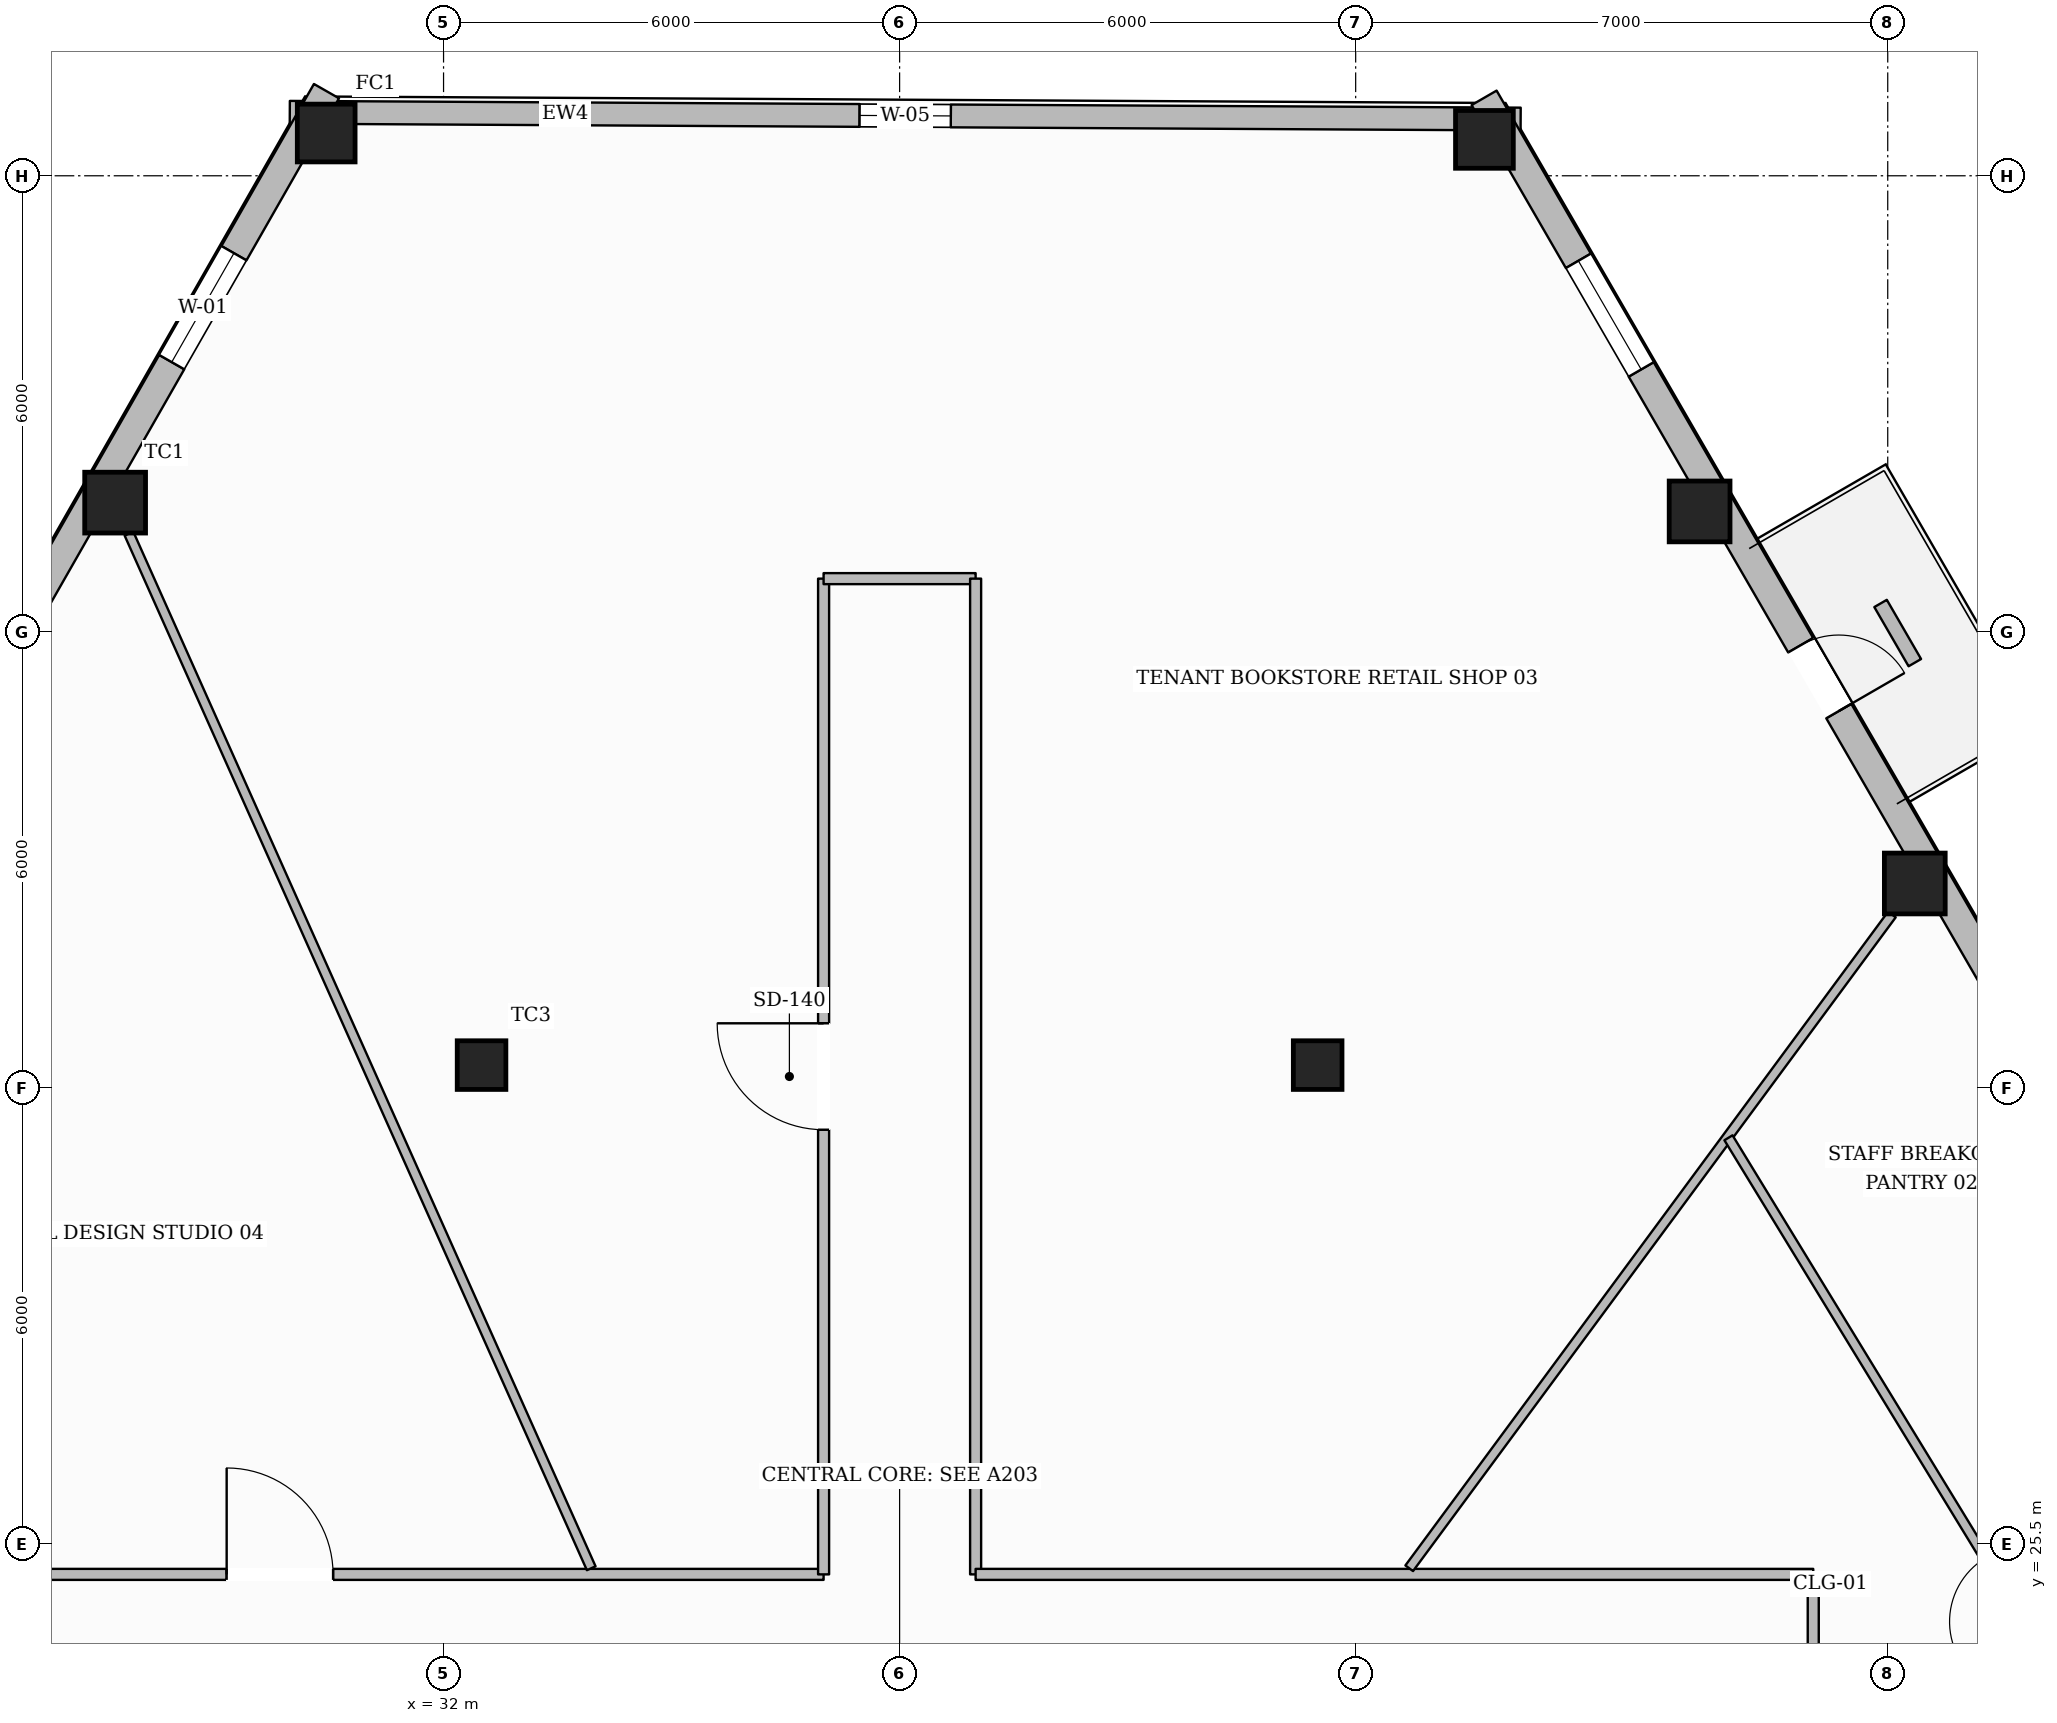
"""IFC4 building model, lengths in metres.
Left out: names, types, materials, properties, quantities, classifications, styles, units other than length and angle.
Written with IfcOpenShell. Run it as: python <this file> out.ifc"""

import sys

from ifc_helpers import new_model, si_unit, direction, frame, frame_2d, origin, origin_2d, place, context, subcontext, project, spatial, rectangle, hollow_rectangle, extrude, element, fill, save


model = new_model("IFC4")
c1 = context("Model", 3, precision=1e-05, world=origin(), true_north=direction((0.0, 1.0)))
c2 = subcontext(c1, "Body", "Model", "MODEL_VIEW")
j1 = project(units=[si_unit("LENGTHUNIT", "METRE"), si_unit("PLANEANGLEUNIT", "RADIAN")], contexts=[c1])
p1 = place(None, origin())
s1 = spatial("IfcSite", under=j1, at=p1, CompositionType="ELEMENT")
p2 = place(p1, origin())
s2 = spatial("IfcBuilding", under=s1, at=p2, CompositionType="ELEMENT")
p3 = place(p2, frame((0.0, 0.0, 40.65)))
s3 = spatial("IfcBuildingStorey", under=s2, at=p3, CompositionType="ELEMENT", Elevation=40.65)
p4 = place(p3, frame((30.456, 44.062, 0.0), z_axis=(0.0, 0.0, 1.0), x_axis=(1.0, 0.0, 0.0)))
e1 = element("IfcColumn", 1, at=p4, inside=s3, PredefinedType="COLUMN", context=c2, shape_type="SweptSolid", body=[
    extrude(hollow_rectangle(XDim=0.76, YDim=0.76, WallThickness=0.035, at=origin_2d()), origin(), (0.0, 0.0, 1.0), 3.59),
])
for number, where, z_axis, x_axis in (
    (2, (27.679, 39.2, 0.0), (0.0, 0.0, 1.0), (1.0, 0.0, 0.0)),
    (3, (51.356, 34.189, 0.0), (0.0, 0.0, 1.0), (1.0, 0.0, 0.0)),
    (4, (48.525, 39.084, 0.0), (0.0, 0.0, 1.0), (1.0, 0.0, 0.0)),
):
    element("IfcColumn", number, at=place(p3, frame(where, z_axis=z_axis, x_axis=x_axis)), inside=s3, PredefinedType="COLUMN", context=c2, shape_type="SweptSolid", body=[
        extrude(hollow_rectangle(XDim=0.8, YDim=0.8, WallThickness=0.036, at=origin_2d()), origin(), (0.0, 0.0, 1.0), 3.59),
    ])
p5 = place(p3, frame((45.694, 43.979, 0.0), z_axis=(0.0, 0.0, 1.0), x_axis=(1.0, 0.0, 0.0)))
e5 = element("IfcColumn", 5, at=p5, inside=s3, PredefinedType="COLUMN", context=c2, shape_type="SweptSolid", body=[
    extrude(hollow_rectangle(XDim=0.76, YDim=0.76, WallThickness=0.035, at=origin_2d()), origin(), (0.0, 0.0, 1.0), 3.59),
])
for number, where, z_axis, x_axis in (
    (6, (32.5, 31.8, 0.0), (0.0, 0.0, 1.0), (1.0, 0.0, 0.0)),
    (7, (43.5, 31.8, 0.0), (0.0, 0.0, 1.0), (1.0, 0.0, 0.0)),
):
    element("IfcColumn", number, at=place(p3, frame(where, z_axis=z_axis, x_axis=x_axis)), inside=s3, PredefinedType="COLUMN", context=c2, shape_type="SweptSolid", body=[
        extrude(hollow_rectangle(XDim=0.64, YDim=0.64, WallThickness=0.028, at=origin_2d()), origin(), (0.0, 0.0, 1.0), 3.59),
    ])
p6 = place(p3, frame((29.977, 44.335, 0.0), z_axis=(0.0, 0.0, 1.0), x_axis=(0.999984941481, -0.005487878522, 0.0)))
e8 = element("IfcWall", 8, at=p6, inside=s3, PredefinedType="STANDARD", context=c2, shape_type="SweptSolid", body=[
    extrude(rectangle(XDim=16.193, YDim=0.3, at=frame_2d((8.097, 0.0))), origin(), (0.0, 0.0, 1.0), 2.97),
])
p7 = place(p6, frame((7.497, 0.0, 0.65)))
e9 = element("IfcOpeningElement", 9, at=p7, cuts=e8, PredefinedType="OPENING", context=c2, shape_type="SweptSolid", body=[
    extrude(rectangle(XDim=1.2, YDim=1.7, at=frame_2d((0.6, 0.85))), frame((0.0, 0.16, 0.0), z_axis=(0.0, -1.0, 0.0), x_axis=(1.0, 0.0, 0.0)), (0.0, 0.0, 1.0), 0.32),
])
p8 = place(p3, frame((13.324, 14.608, 0.0), z_axis=(0.0, 0.0, 1.0), x_axis=(0.495909124573, 0.868374423947, 0.0)))
e10 = element("IfcWall", 10, at=p8, inside=s3, PredefinedType="STANDARD", context=c2, shape_type="SweptSolid", body=[
    extrude(rectangle(XDim=34.553, YDim=0.38, at=frame_2d((17.277, 0.0))), origin(), (0.0, 0.0, 1.0), 2.97),
])
p9 = place(p8, frame((30.448, 0.0, 0.65)))
e11 = element("IfcOpeningElement", 11, at=p9, cuts=e10, PredefinedType="OPENING", context=c2, shape_type="SweptSolid", body=[
    extrude(rectangle(XDim=1.65, YDim=1.75, at=frame_2d((0.825, 0.875))), frame((0.0, 0.2, 0.0), z_axis=(0.0, -1.0, 0.0), x_axis=(1.0, 0.0, 0.0)), (0.0, 0.0, 1.0), 0.4),
])
p10 = place(p8, frame((24.849, 0.0, 0.65)))
e12 = element("IfcOpeningElement", 12, at=p10, cuts=e10, PredefinedType="OPENING", context=c2, shape_type="SweptSolid", body=[
    extrude(rectangle(XDim=1.65, YDim=1.75, at=frame_2d((0.825, 0.875))), frame((0.0, 0.2, 0.0), z_axis=(0.0, -1.0, 0.0), x_axis=(1.0, 0.0, 0.0)), (0.0, 0.0, 1.0), 0.4),
])
p11 = place(p8, frame((19.249, 0.0, 0.65)))
e13 = element("IfcOpeningElement", 13, at=p11, cuts=e10, PredefinedType="OPENING", context=c2, shape_type="SweptSolid", body=[
    extrude(rectangle(XDim=1.65, YDim=1.75, at=frame_2d((0.825, 0.875))), frame((0.0, 0.2, 0.0), z_axis=(0.0, -1.0, 0.0), x_axis=(1.0, 0.0, 0.0)), (0.0, 0.0, 1.0), 0.4),
])
p12 = place(p8, frame((8.05, 0.0, 0.65)))
e14 = element("IfcOpeningElement", 14, at=p12, cuts=e10, PredefinedType="OPENING", context=c2, shape_type="SweptSolid", body=[
    extrude(rectangle(XDim=1.65, YDim=1.75, at=frame_2d((0.825, 0.875))), frame((0.0, 0.2, 0.0), z_axis=(0.0, -1.0, 0.0), x_axis=(1.0, 0.0, 0.0)), (0.0, 0.0, 1.0), 0.4),
])
p13 = place(p8, frame((2.451, 0.0, 0.65)))
e15 = element("IfcOpeningElement", 15, at=p13, cuts=e10, PredefinedType="OPENING", context=c2, shape_type="SweptSolid", body=[
    extrude(rectangle(XDim=1.65, YDim=1.75, at=frame_2d((0.825, 0.875))), frame((0.0, 0.2, 0.0), z_axis=(0.0, -1.0, 0.0), x_axis=(1.0, 0.0, 0.0)), (0.0, 0.0, 1.0), 0.4),
])
p14 = place(p3, frame((45.69, 44.525, 0.0), z_axis=(0.0, 0.0, 1.0), x_axis=(0.500663446356, -0.865642023866, 0.0)))
e16 = element("IfcWall", 16, at=p14, inside=s3, PredefinedType="STANDARD", context=c2, shape_type="SweptSolid", body=[
    extrude(rectangle(XDim=34.878, YDim=0.38, at=frame_2d((17.439, 0.0))), origin(), (0.0, 0.0, 1.0), 2.97),
])
p15 = place(p14, frame((8.319, 0.0, 0.0)))
e17 = element("IfcOpeningElement", 17, at=p15, cuts=e16, PredefinedType="OPENING", context=c2, shape_type="SweptSolid", body=[
    extrude(rectangle(XDim=1.0, YDim=2.2, at=frame_2d((0.5, 1.1))), frame((0.0, 0.2, 0.0), z_axis=(0.0, -1.0, 0.0), x_axis=(1.0, 0.0, 0.0)), (0.0, 0.0, 1.0), 0.4),
])
p16 = place(p14, frame((30.75, 0.0, 0.65)))
e18 = element("IfcOpeningElement", 18, at=p16, cuts=e16, PredefinedType="OPENING", context=c2, shape_type="SweptSolid", body=[
    extrude(rectangle(XDim=1.65, YDim=1.75, at=frame_2d((0.825, 0.875))), frame((0.0, 0.2, 0.0), z_axis=(0.0, -1.0, 0.0), x_axis=(1.0, 0.0, 0.0)), (0.0, 0.0, 1.0), 0.4),
])
p17 = place(p14, frame((25.095, 0.0, 0.65)))
e19 = element("IfcOpeningElement", 19, at=p17, cuts=e16, PredefinedType="OPENING", context=c2, shape_type="SweptSolid", body=[
    extrude(rectangle(XDim=1.65, YDim=1.75, at=frame_2d((0.825, 0.875))), frame((0.0, 0.2, 0.0), z_axis=(0.0, -1.0, 0.0), x_axis=(1.0, 0.0, 0.0)), (0.0, 0.0, 1.0), 0.4),
])
p18 = place(p14, frame((19.441, 0.0, 0.65)))
e20 = element("IfcOpeningElement", 20, at=p18, cuts=e16, PredefinedType="OPENING", context=c2, shape_type="SweptSolid", body=[
    extrude(rectangle(XDim=1.65, YDim=1.75, at=frame_2d((0.825, 0.875))), frame((0.0, 0.2, 0.0), z_axis=(0.0, -1.0, 0.0), x_axis=(1.0, 0.0, 0.0)), (0.0, 0.0, 1.0), 0.4),
])
p19 = place(p14, frame((2.477, 0.0, 0.65)))
e21 = element("IfcOpeningElement", 21, at=p19, cuts=e16, PredefinedType="OPENING", context=c2, shape_type="SweptSolid", body=[
    extrude(rectangle(XDim=1.65, YDim=1.75, at=frame_2d((0.825, 0.875))), frame((0.0, 0.2, 0.0), z_axis=(0.0, -1.0, 0.0), x_axis=(1.0, 0.0, 0.0)), (0.0, 0.0, 1.0), 0.4),
])
p20 = place(p3, frame((51.356, 37.094, 0.0), z_axis=(0.0, 0.0, 1.0), x_axis=(-0.500747535571, 0.865593383535, 0.0)))
e22 = element("IfcWall", 22, at=p20, inside=s3, PredefinedType="USERDEFINED", context=c2, shape_type="SweptSolid", body=[
    extrude(rectangle(XDim=0.9, YDim=0.19, at=frame_2d((0.45, 0.0))), origin(), (0.0, 0.0, 1.0), 0.5),
])
p21 = place(p3, frame((25.98, 25.1, 0.0), z_axis=(0.0, 0.0, 1.0), x_axis=(1.0, 0.0, 0.0)))
e23 = element("IfcWall", 23, at=p21, inside=s3, PredefinedType="PARTITIONING", context=c2, shape_type="SweptSolid", body=[
    extrude(rectangle(XDim=11.02, YDim=0.145, at=frame_2d((5.51, 0.0))), origin(), (0.0, 0.0, 1.0), 3.59),
])
p22 = place(p21, frame((3.167, 0.0, 0.0)))
e24 = element("IfcOpeningElement", 24, at=p22, cuts=e23, PredefinedType="OPENING", context=c2, shape_type="SweptSolid", body=[
    extrude(rectangle(XDim=1.4, YDim=2.2, at=frame_2d((0.7, 1.1))), frame((0.0, 0.083, 0.0), z_axis=(0.0, -1.0, 0.0), x_axis=(1.0, 0.0, 0.0)), (0.0, 0.0, 1.0), 0.165),
])
p23 = place(p3, frame((37.0, 25.1, 0.0), z_axis=(0.0, 0.0, 1.0), x_axis=(0.0, 1.0, 0.0)))
e25 = element("IfcWall", 25, at=p23, inside=s3, PredefinedType="PARTITIONING", context=c2, shape_type="SweptSolid", body=[
    extrude(rectangle(XDim=13.1, YDim=0.145, at=frame_2d((6.55, 0.0))), origin(), (0.0, 0.0, 1.0), 3.59),
])
p24 = place(p23, frame((5.85, 0.0, 0.0)))
e26 = element("IfcOpeningElement", 26, at=p24, cuts=e25, PredefinedType="OPENING", context=c2, shape_type="SweptSolid", body=[
    extrude(rectangle(XDim=1.4, YDim=2.2, at=frame_2d((0.7, 1.1))), frame((0.0, 0.083, 0.0), z_axis=(0.0, -1.0, 0.0), x_axis=(1.0, 0.0, 0.0)), (0.0, 0.0, 1.0), 0.165),
])
p25 = place(p3, frame((37.0, 38.2, 0.0), z_axis=(0.0, 0.0, 1.0), x_axis=(1.0, 0.0, 0.0)))
e27 = element("IfcWall", 27, at=p25, inside=s3, PredefinedType="PARTITIONING", context=c2, shape_type="SweptSolid", body=[
    extrude(rectangle(XDim=2.0, YDim=0.145, at=frame_2d((1.0, 0.0))), origin(), (0.0, 0.0, 1.0), 3.59),
])
p26 = place(p3, frame((39.0, 38.2, 0.0), z_axis=(0.0, 0.0, 1.0), x_axis=(0.0, -1.0, 0.0)))
e28 = element("IfcWall", 28, at=p26, inside=s3, PredefinedType="PARTITIONING", context=c2, shape_type="SweptSolid", body=[
    extrude(rectangle(XDim=13.1, YDim=0.145, at=frame_2d((6.55, 0.0))), origin(), (0.0, 0.0, 1.0), 3.59),
])
p27 = place(p3, frame((39.0, 25.1, 0.0), z_axis=(0.0, 0.0, 1.0), x_axis=(1.0, 0.0, 0.0)))
e29 = element("IfcWall", 29, at=p27, inside=s3, PredefinedType="PARTITIONING", context=c2, shape_type="SweptSolid", body=[
    extrude(rectangle(XDim=11.02, YDim=0.145, at=frame_2d((5.51, 0.0))), origin(), (0.0, 0.0, 1.0), 3.59),
])
p28 = place(p3, frame((50.02, 25.1, 0.0), z_axis=(0.0, 0.0, 1.0), x_axis=(0.0, -1.0, 0.0)))
e30 = element("IfcWall", 30, at=p28, inside=s3, PredefinedType="PARTITIONING", context=c2, shape_type="SweptSolid", body=[
    extrude(rectangle(XDim=16.0, YDim=0.145, at=frame_2d((8.0, 0.0))), origin(), (0.0, 0.0, 1.0), 3.278),
])
p29 = place(p28, frame((3.152, 0.0, 0.0)))
e31 = element("IfcOpeningElement", 31, at=p29, cuts=e30, PredefinedType="OPENING", context=c2, shape_type="SweptSolid", body=[
    extrude(rectangle(XDim=0.98, YDim=2.15, at=frame_2d((0.49, 1.075))), frame((0.0, 0.083, 0.0), z_axis=(0.0, -1.0, 0.0), x_axis=(1.0, 0.0, 0.0)), (0.0, 0.0, 1.0), 0.165),
])
p30 = place(p3, frame((44.704, 25.18, 0.0), z_axis=(0.0, 0.0, 1.0), x_axis=(0.593980052091, 0.804479768371, 0.0)))
e32 = element("IfcWall", 32, at=p30, inside=s3, PredefinedType="PARTITIONING", context=c2, shape_type="SweptSolid", body=[
    extrude(rectangle(XDim=10.691, YDim=0.125, at=frame_2d((5.346, 0.0))), origin(), (0.0, 0.0, 1.0), 3.057),
])
p31 = place(p3, frame((33.943, 25.18, 0.0), z_axis=(0.0, 0.0, 1.0), x_axis=(-0.407913921954, 0.913020389847, 0.0)))
e33 = element("IfcWall", 33, at=p31, inside=s3, PredefinedType="PARTITIONING", context=c2, shape_type="SweptSolid", body=[
    extrude(rectangle(XDim=14.908, YDim=0.125, at=frame_2d((7.454, 0.0))), origin(), (0.0, 0.0, 1.0), 3.057),
])
p32 = place(p3, frame((56.171, 18.947, 0.0), z_axis=(0.0, 0.0, 1.0), x_axis=(-0.521265818692, 0.853394367373, 0.0)))
e34 = element("IfcWall", 34, at=p32, inside=s3, PredefinedType="PARTITIONING", context=c2, shape_type="SweptSolid", body=[
    extrude(rectangle(XDim=13.941, YDim=0.125, at=frame_2d((6.97, 0.0))), origin(), (0.0, 0.0, 1.0), 3.59),
])
p33 = place(p32, frame((6.481, 0.0, 0.0)))
e35 = element("IfcOpeningElement", 35, at=p33, cuts=e34, PredefinedType="OPENING", context=c2, shape_type="SweptSolid", body=[
    extrude(rectangle(XDim=0.98, YDim=2.15, at=frame_2d((0.49, 1.075))), frame((0.0, 0.073, 0.0), z_axis=(0.0, -1.0, 0.0), x_axis=(1.0, 0.0, 0.0)), (0.0, 0.0, 1.0), 0.145),
])
p34 = place(p15, origin())
e36 = element("IfcDoor", 36, at=p34, inside=s3, OperationType="SINGLE_SWING_RIGHT", PredefinedType="DOOR", context=c2, shape_type="SweptSolid", body=[
    extrude(rectangle(XDim=1.0, YDim=2.2, at=frame_2d((0.5, 1.1))), frame((0.0, 0.025, 0.0), z_axis=(0.0, -1.0, 0.0), x_axis=(1.0, 0.0, 0.0)), (0.0, 0.0, 1.0), 0.05),
])
fill(e17, e36)
p35 = place(p9, origin())
e37 = element("IfcWindow", 37, at=p35, inside=s3, PartitioningType="SINGLE_PANEL", PredefinedType="WINDOW", context=c2, shape_type="SweptSolid", body=[
    extrude(rectangle(XDim=1.65, YDim=1.75, at=frame_2d((0.825, 0.875))), frame((0.0, 0.03, 0.0), z_axis=(0.0, -1.0, 0.0), x_axis=(1.0, 0.0, 0.0)), (0.0, 0.0, 1.0), 0.06),
])
fill(e11, e37)
p36 = place(p19, origin())
e38 = element("IfcWindow", 38, at=p36, inside=s3, PartitioningType="SINGLE_PANEL", PredefinedType="WINDOW", context=c2, shape_type="SweptSolid", body=[
    extrude(rectangle(XDim=1.65, YDim=1.75, at=frame_2d((0.825, 0.875))), frame((0.0, 0.03, 0.0), z_axis=(0.0, -1.0, 0.0), x_axis=(1.0, 0.0, 0.0)), (0.0, 0.0, 1.0), 0.06),
])
fill(e21, e38)
p37 = place(p7, origin())
e39 = element("IfcWindow", 39, at=p37, inside=s3, PartitioningType="SINGLE_PANEL", PredefinedType="WINDOW", context=c2, shape_type="SweptSolid", body=[
    extrude(rectangle(XDim=1.2, YDim=1.7, at=frame_2d((0.6, 0.85))), frame((0.0, 0.03, 0.0), z_axis=(0.0, -1.0, 0.0), x_axis=(1.0, 0.0, 0.0)), (0.0, 0.0, 1.0), 0.06),
])
fill(e9, e39)
p38 = place(p24, origin())
e40 = element("IfcDoor", 40, at=p38, inside=s3, OperationType="SINGLE_SWING_RIGHT", PredefinedType="DOOR", context=c2, shape_type="SweptSolid", body=[
    extrude(rectangle(XDim=1.4, YDim=2.2, at=frame_2d((0.7, 1.1))), frame((0.0, 0.025, 0.0), z_axis=(0.0, -1.0, 0.0), x_axis=(1.0, 0.0, 0.0)), (0.0, 0.0, 1.0), 0.05),
])
fill(e26, e40)
p39 = place(p22, origin())
e41 = element("IfcDoor", 41, at=p39, inside=s3, OperationType="SINGLE_SWING_LEFT", PredefinedType="DOOR", context=c2, shape_type="SweptSolid", body=[
    extrude(rectangle(XDim=1.4, YDim=2.2, at=frame_2d((0.7, 1.1))), frame((0.0, 0.025, 0.0), z_axis=(0.0, -1.0, 0.0), x_axis=(1.0, 0.0, 0.0)), (0.0, 0.0, 1.0), 0.05),
])
fill(e24, e41)
save(model, sys.argv[1])
